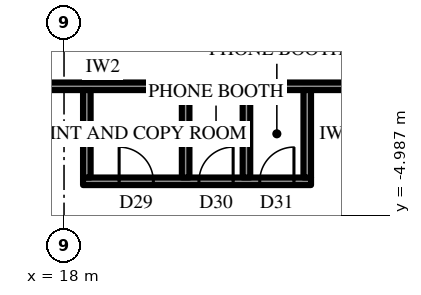
"""IFC4 building model, lengths in metres.
Left out: names, types, materials, properties, quantities, classifications, styles, units other than length and angle.
Written with IfcOpenShell. Run it as: python <this file> out.ifc"""

import sys

from ifc_helpers import new_model, si_unit, direction, frame, frame_2d, origin, place, context, subcontext, project, spatial, rectangle, extrude, element, fill, save


model = new_model("IFC4")
c1 = context("Model", 3, precision=1e-05, world=origin(), true_north=direction((0.0, 1.0)))
c2 = subcontext(c1, "Body", "Model", "MODEL_VIEW")
j1 = project(units=[si_unit("LENGTHUNIT", "METRE"), si_unit("PLANEANGLEUNIT", "RADIAN")], contexts=[c1])
p1 = place(None, origin())
s1 = spatial("IfcSite", under=j1, at=p1, CompositionType="ELEMENT")
p2 = place(p1, origin())
s2 = spatial("IfcBuilding", under=s1, at=p2, CompositionType="ELEMENT")
p3 = place(p2, frame((0.0, 0.0, 349.3)))
s3 = spatial("IfcBuildingStorey", under=s2, at=p3, CompositionType="ELEMENT", Elevation=349.3)
p4 = place(p3, frame((24.677, -10.458, 0.0), z_axis=(0.0, 0.0, 1.0), x_axis=(0.499996453679, 0.866027451244, 0.0)))
e1 = element("IfcWall", 1, at=p4, inside=s3, PredefinedType="SOLIDWALL", context=c2, shape_type="SweptSolid", body=[
    extrude(rectangle(XDim=9.564, YDim=0.3, at=frame_2d((4.782, 0.0))), origin(), (0.0, 0.0, 1.0), 2.9),
])
p5 = place(p4, frame((1.866, 0.0, 0.6)))
e2 = element("IfcOpeningElement", 2, at=p5, cuts=e1, PredefinedType="OPENING", context=c2, shape_type="SweptSolid", body=[
    extrude(rectangle(XDim=2.55, YDim=2.05, at=frame_2d((1.275, 1.025))), frame((0.0, 0.16, 0.0), z_axis=(0.0, -1.0, 0.0), x_axis=(1.0, 0.0, 0.0)), (0.0, 0.0, 1.0), 0.32),
])
p6 = place(p4, frame((6.148, 0.0, 0.6)))
e3 = element("IfcOpeningElement", 3, at=p6, cuts=e1, PredefinedType="OPENING", context=c2, shape_type="SweptSolid", body=[
    extrude(rectangle(XDim=2.55, YDim=2.05, at=frame_2d((1.275, 1.025))), frame((0.0, 0.16, 0.0), z_axis=(0.0, -1.0, 0.0), x_axis=(1.0, 0.0, 0.0)), (0.0, 0.0, 1.0), 0.32),
])
p7 = place(p3, frame((12.425, -1.6, 0.0), z_axis=(0.0, 0.0, 1.0), x_axis=(1.0, 0.0, 0.0)))
e4 = element("IfcWall", 4, at=p7, inside=s3, PredefinedType="PARTITIONING", context=c2, shape_type="SweptSolid", body=[
    extrude(rectangle(XDim=16.5, YDim=0.2, at=frame_2d((8.25, 0.0))), origin(), (0.0, 0.0, 1.0), 4.0),
])
p8 = place(p7, frame((1.15, 0.0, 0.0)))
e5 = element("IfcOpeningElement", 5, at=p8, cuts=e4, PredefinedType="OPENING", context=c2, shape_type="SweptSolid", body=[
    extrude(rectangle(XDim=1.0, YDim=2.2, at=frame_2d((0.5, 1.1))), frame((0.0, 0.11, 0.0), z_axis=(0.0, -1.0, 0.0), x_axis=(1.0, 0.0, 0.0)), (0.0, 0.0, 1.0), 0.22),
])
p9 = place(p3, frame((18.5, -4.1, 0.0), z_axis=(0.0, 0.0, 1.0), x_axis=(1.0, 0.0, 0.0)))
e6 = element("IfcWall", 6, at=p9, inside=s3, PredefinedType="PARTITIONING", context=c2, shape_type="SweptSolid", body=[
    extrude(rectangle(XDim=6.0, YDim=0.2, at=frame_2d((3.0, 0.0))), origin(), (0.0, 0.0, 1.0), 4.0),
])
p10 = place(p9, frame((0.95, 0.0, 0.0)))
e7 = element("IfcOpeningElement", 7, at=p10, cuts=e6, PredefinedType="OPENING", context=c2, shape_type="SweptSolid", body=[
    extrude(rectangle(XDim=0.9, YDim=2.2, at=frame_2d((0.45, 1.1))), frame((0.0, 0.11, 0.0), z_axis=(0.0, -1.0, 0.0), x_axis=(1.0, 0.0, 0.0)), (0.0, 0.0, 1.0), 0.22),
])
p11 = place(p9, frame((3.05, 0.0, 0.0)))
e8 = element("IfcOpeningElement", 8, at=p11, cuts=e6, PredefinedType="OPENING", context=c2, shape_type="SweptSolid", body=[
    extrude(rectangle(XDim=0.9, YDim=2.2, at=frame_2d((0.45, 1.1))), frame((0.0, 0.11, 0.0), z_axis=(0.0, -1.0, 0.0), x_axis=(1.0, 0.0, 0.0)), (0.0, 0.0, 1.0), 0.22),
])
p12 = place(p9, frame((4.65, 0.0, 0.0)))
e9 = element("IfcOpeningElement", 9, at=p12, cuts=e6, PredefinedType="OPENING", context=c2, shape_type="SweptSolid", body=[
    extrude(rectangle(XDim=0.9, YDim=2.2, at=frame_2d((0.45, 1.1))), frame((0.0, 0.11, 0.0), z_axis=(0.0, -1.0, 0.0), x_axis=(1.0, 0.0, 0.0)), (0.0, 0.0, 1.0), 0.22),
])
for number, where, z_axis, x_axis in (
    (10, (18.6, -1.7, 0.0), (0.0, 0.0, 1.0), (0.0, -1.0, 0.0)),
    (11, (21.2, -1.7, 0.0), (0.0, 0.0, 1.0), (0.0, -1.0, 0.0)),
    (12, (22.8, -1.7, 0.0), (0.0, 0.0, 1.0), (0.0, -1.0, 0.0)),
    (13, (24.4, -1.7, 0.0), (0.0, 0.0, 1.0), (0.0, -1.0, 0.0)),
):
    element("IfcWall", number, at=place(p3, frame(where, z_axis=z_axis, x_axis=x_axis)), inside=s3, PredefinedType="PARTITIONING", context=c2, shape_type="SweptSolid", body=[
        extrude(rectangle(XDim=2.3, YDim=0.2, at=frame_2d((1.15, 0.0))), origin(), (0.0, 0.0, 1.0), 4.0),
    ])
p13 = place(p10, origin())
e14 = element("IfcDoor", 14, at=p13, inside=s3, OperationType="SINGLE_SWING_RIGHT", PredefinedType="DOOR", context=c2, shape_type="SweptSolid", body=[
    extrude(rectangle(XDim=0.9, YDim=2.2, at=frame_2d((0.45, 1.1))), frame((0.0, 0.025, 0.0), z_axis=(0.0, -1.0, 0.0), x_axis=(1.0, 0.0, 0.0)), (0.0, 0.0, 1.0), 0.05),
])
fill(e7, e14)
p14 = place(p11, origin())
e15 = element("IfcDoor", 15, at=p14, inside=s3, OperationType="SINGLE_SWING_LEFT", PredefinedType="DOOR", context=c2, shape_type="SweptSolid", body=[
    extrude(rectangle(XDim=0.9, YDim=2.2, at=frame_2d((0.45, 1.1))), frame((0.0, 0.025, 0.0), z_axis=(0.0, -1.0, 0.0), x_axis=(1.0, 0.0, 0.0)), (0.0, 0.0, 1.0), 0.05),
])
fill(e8, e15)
p15 = place(p12, origin())
e16 = element("IfcDoor", 16, at=p15, inside=s3, OperationType="SINGLE_SWING_LEFT", PredefinedType="DOOR", context=c2, shape_type="SweptSolid", body=[
    extrude(rectangle(XDim=0.9, YDim=2.2, at=frame_2d((0.45, 1.1))), frame((0.0, 0.025, 0.0), z_axis=(0.0, -1.0, 0.0), x_axis=(1.0, 0.0, 0.0)), (0.0, 0.0, 1.0), 0.05),
])
fill(e9, e16)
save(model, sys.argv[1])
